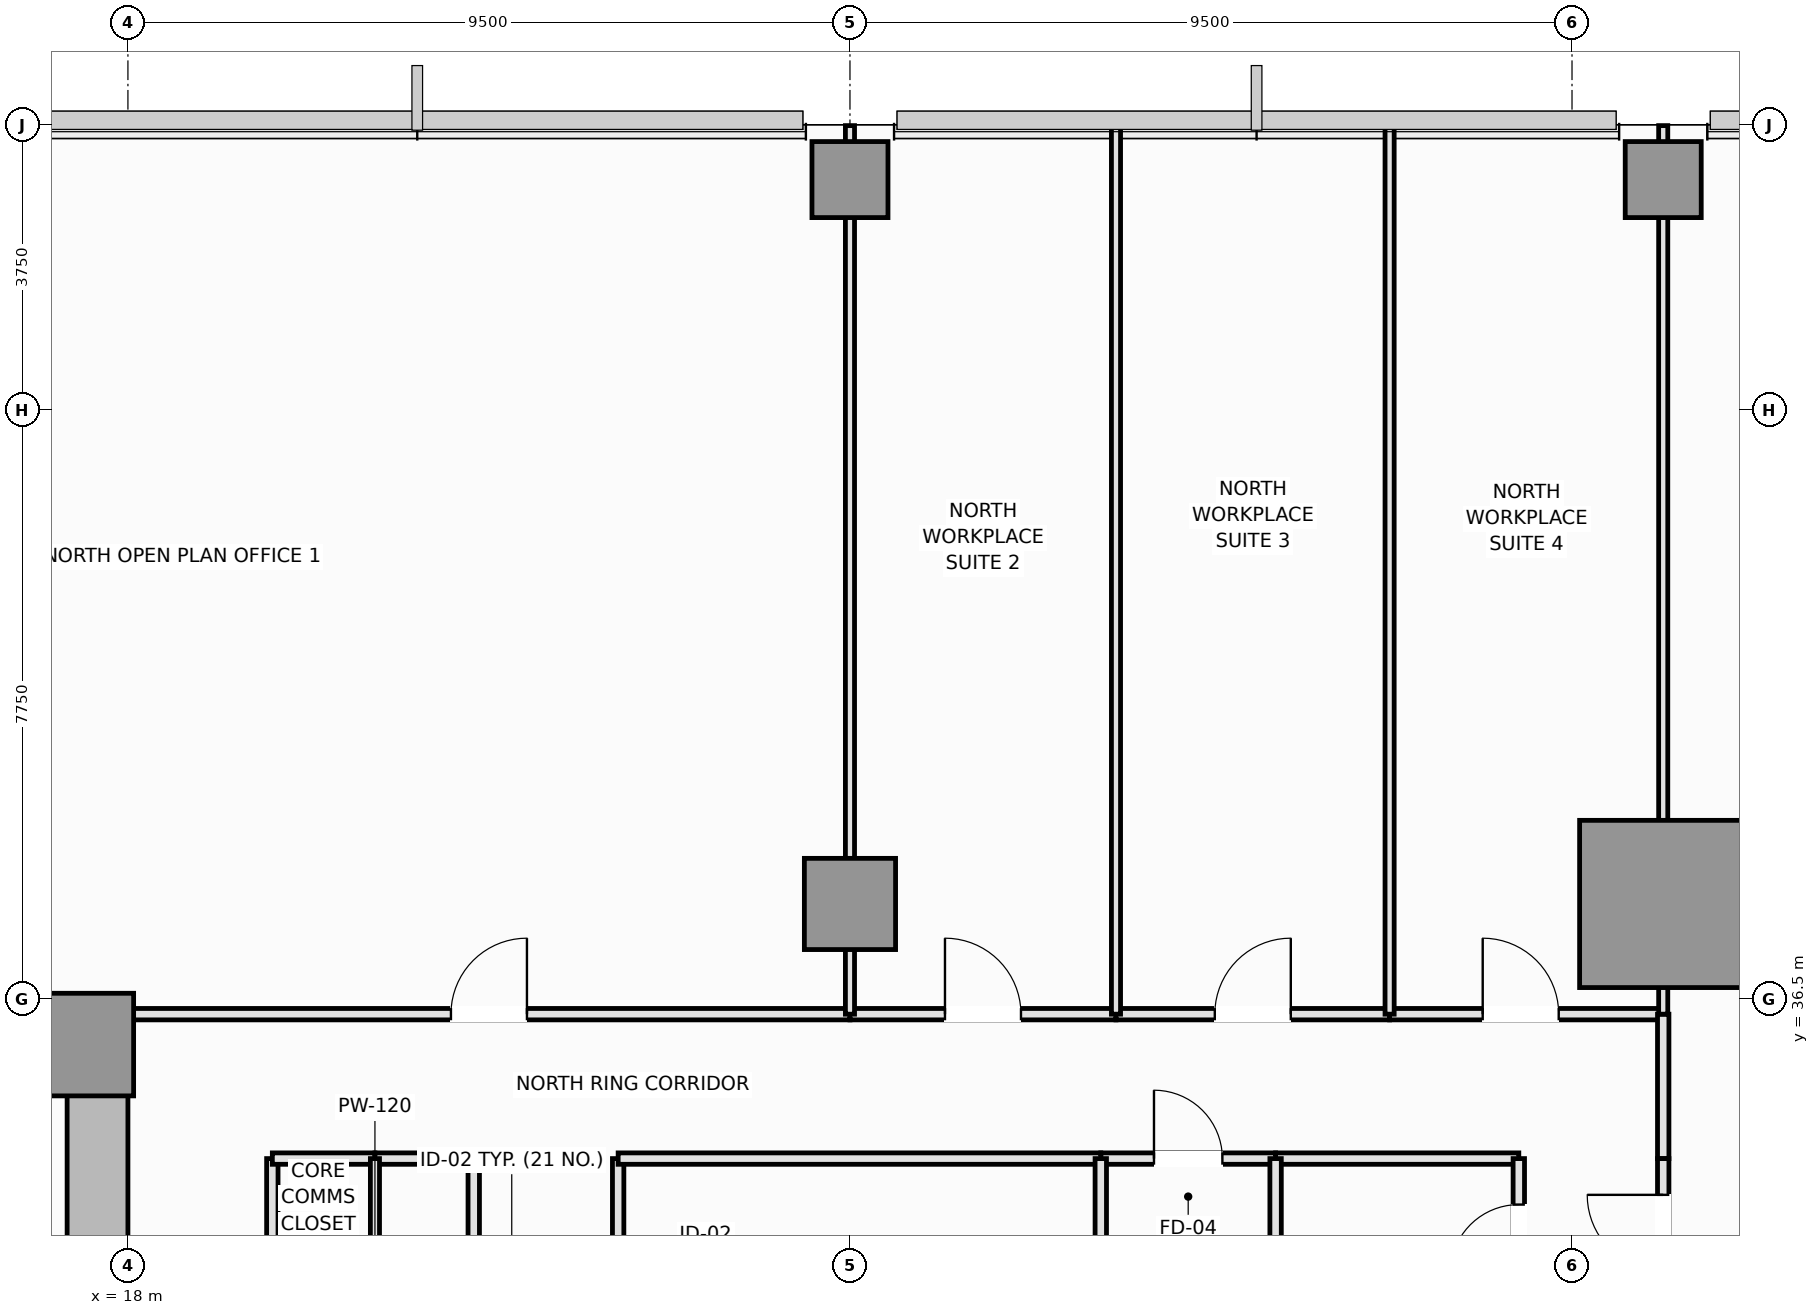
"""IFC4 building model, lengths in metres.
Left out: names, types, materials, properties, quantities, classifications, styles, units other than length and angle.
Written with IfcOpenShell. Run it as: python <this file> out.ifc"""

import sys

from ifc_helpers import new_model, si_unit, direction, frame, frame_2d, origin, origin_2d, place, context, subcontext, project, spatial, rectangle, extrude, element, fill, save


model = new_model("IFC4")
c1 = context("Model", 3, precision=1e-05, world=origin(), true_north=direction((0.0, 1.0)))
c2 = subcontext(c1, "Body", "Model", "MODEL_VIEW")
j1 = project(units=[si_unit("LENGTHUNIT", "METRE"), si_unit("PLANEANGLEUNIT", "RADIAN")], contexts=[c1])
p1 = place(None, origin())
s1 = spatial("IfcSite", under=j1, at=p1, CompositionType="ELEMENT")
p2 = place(p1, origin())
s2 = spatial("IfcBuilding", under=s1, at=p2, CompositionType="ELEMENT")
p3 = place(p2, frame((0.0, 0.0, 78.85)))
s3 = spatial("IfcBuildingStorey", under=s2, at=p3, CompositionType="ELEMENT", Elevation=78.85)
p4 = place(p3, frame((4.5, 36.1, 0.0), z_axis=(0.0, 0.0, 1.0), x_axis=(1.0, 0.0, 0.0)))
e1 = element("IfcWall", 1, at=p4, inside=s3, PredefinedType="SHEAR", context=c2, shape_type="SweptSolid", body=[
    extrude(rectangle(XDim=13.5, YDim=0.8, at=frame_2d((6.75, 0.0))), origin(), (0.0, 0.0, 1.0), 3.55),
])
p5 = place(p3, frame((17.6, 27.05, 0.0), z_axis=(0.0, 0.0, 1.0), x_axis=(0.0, 1.0, 0.0)))
e2 = element("IfcWall", 2, at=p5, inside=s3, PredefinedType="SHEAR", context=c2, shape_type="SweptSolid", body=[
    extrude(rectangle(XDim=8.65, YDim=0.8, at=frame_2d((4.325, 0.0))), origin(), (0.0, 0.0, 1.0), 3.55),
])
p6 = place(p5, frame((3.45, 0.0, 0.0)))
e3 = element("IfcOpeningElement", 3, at=p6, cuts=e2, PredefinedType="OPENING", context=c2, shape_type="SweptSolid", body=[
    extrude(rectangle(XDim=1.1, YDim=2.15, at=frame_2d((0.55, 1.075))), frame((0.0, 0.41, 0.0), z_axis=(0.0, -1.0, 0.0), x_axis=(1.0, 0.0, 0.0)), (0.0, 0.0, 1.0), 0.82),
])
p7 = place(p3, frame((17.4, 35.9, 0.0), z_axis=(0.0, 0.0, 1.0), x_axis=(1.0, 0.0, 0.0)))
e4 = element("IfcColumn", 4, at=p7, inside=s3, PredefinedType="PILASTER", context=c2, shape_type="SweptSolid", body=[
    extrude(rectangle(XDim=1.35, YDim=1.35, at=origin_2d()), origin(), (0.0, 0.0, 1.0), 3.55),
])
p8 = place(p3, frame((38.2, 37.75, 0.0), z_axis=(0.0, 0.0, 1.0), x_axis=(1.0, 0.0, 0.0)))
e5 = element("IfcColumn", 5, at=p8, inside=s3, PredefinedType="COLUMN", context=c2, shape_type="SweptSolid", body=[
    extrude(rectangle(XDim=2.2, YDim=2.2, at=origin_2d()), origin(), (0.0, 0.0, 1.0), 3.55),
])
p9 = place(p3, frame((27.5, 37.75, 0.0), z_axis=(0.0, 0.0, 1.0), x_axis=(1.0, 0.0, 0.0)))
e6 = element("IfcColumn", 6, at=p9, inside=s3, PredefinedType="COLUMN", context=c2, shape_type="SweptSolid", body=[
    extrude(rectangle(XDim=1.2, YDim=1.2, at=origin_2d()), origin(), (0.0, 0.0, 1.0), 3.55),
])
for number, where, z_axis, x_axis in (
    (7, (27.5, 47.28, 0.0), (0.0, 0.0, 1.0), (1.0, 0.0, 0.0)),
    (8, (38.2, 47.28, 0.0), (0.0, 0.0, 1.0), (1.0, 0.0, 0.0)),
):
    element("IfcColumn", number, at=place(p3, frame(where, z_axis=z_axis, x_axis=x_axis)), inside=s3, PredefinedType="COLUMN", context=c2, shape_type="SweptSolid", body=[
        extrude(rectangle(XDim=1.0, YDim=1.0, at=origin_2d()), origin(), (0.0, 0.0, 1.0), 3.55),
    ])
p10 = place(p3, frame((22.55, 29.75, 0.0), z_axis=(0.0, 0.0, 1.0), x_axis=(0.0, 1.0, 0.0)))
e9 = element("IfcWall", 9, at=p10, inside=s3, PredefinedType="PARTITIONING", context=c2, shape_type="SweptSolid", body=[
    extrude(rectangle(XDim=4.65, YDim=0.15, at=frame_2d((2.325, 0.0))), origin(), (0.0, 0.0, 1.0), 3.01),
])
p11 = place(p10, frame((1.825, 0.0, 0.0)))
e10 = element("IfcOpeningElement", 10, at=p11, cuts=e9, PredefinedType="OPENING", context=c2, shape_type="SweptSolid", body=[
    extrude(rectangle(XDim=1.0, YDim=2.15, at=frame_2d((0.5, 1.075))), frame((0.0, 0.085, 0.0), z_axis=(0.0, -1.0, 0.0), x_axis=(1.0, 0.0, 0.0)), (0.0, 0.0, 1.0), 0.17),
])
p12 = place(p3, frame((24.45, 31.3, 0.0), z_axis=(0.0, 0.0, 1.0), x_axis=(0.0, 1.0, 0.0)))
e11 = element("IfcWall", 11, at=p12, inside=s3, PredefinedType="PARTITIONING", context=c2, shape_type="SweptSolid", body=[
    extrude(rectangle(XDim=3.1, YDim=0.15, at=frame_2d((1.55, 0.0))), origin(), (0.0, 0.0, 1.0), 3.37),
])
p13 = place(p12, frame((1.05, 0.0, 0.0)))
e12 = element("IfcOpeningElement", 12, at=p13, cuts=e11, PredefinedType="OPENING", context=c2, shape_type="SweptSolid", body=[
    extrude(rectangle(XDim=1.0, YDim=2.15, at=frame_2d((0.5, 1.075))), frame((0.0, 0.085, 0.0), z_axis=(0.0, -1.0, 0.0), x_axis=(1.0, 0.0, 0.0)), (0.0, 0.0, 1.0), 0.17),
])
p14 = place(p3, frame((19.9, 29.75, 0.0), z_axis=(0.0, 0.0, 1.0), x_axis=(0.0, 1.0, 0.0)))
e13 = element("IfcWall", 13, at=p14, inside=s3, PredefinedType="PARTITIONING", context=c2, shape_type="SweptSolid", body=[
    extrude(rectangle(XDim=4.65, YDim=0.15, at=frame_2d((2.325, 0.0))), origin(), (0.0, 0.0, 1.0), 3.37),
])
p15 = place(p14, frame((1.825, 0.0, 0.0)))
e14 = element("IfcOpeningElement", 14, at=p15, cuts=e13, PredefinedType="OPENING", context=c2, shape_type="SweptSolid", body=[
    extrude(rectangle(XDim=1.0, YDim=2.15, at=frame_2d((0.5, 1.075))), frame((0.0, 0.085, 0.0), z_axis=(0.0, -1.0, 0.0), x_axis=(1.0, 0.0, 0.0)), (0.0, 0.0, 1.0), 0.17),
])
p16 = place(p3, frame((19.9, 34.4, 0.0), z_axis=(0.0, 0.0, 1.0), x_axis=(1.0, 0.0, 0.0)))
e15 = element("IfcWall", 15, at=p16, inside=s3, PredefinedType="PARTITIONING", context=c2, shape_type="SweptSolid", body=[
    extrude(rectangle(XDim=1.35, YDim=0.15, at=frame_2d((0.675, 0.0))), origin(), (0.0, 0.0, 1.0), 3.37),
])
p17 = place(p3, frame((21.25, 34.4, 0.0), z_axis=(0.0, 0.0, 1.0), x_axis=(1.0, 0.0, 0.0)))
e16 = element("IfcWall", 16, at=p17, inside=s3, PredefinedType="PARTITIONING", context=c2, shape_type="SweptSolid", body=[
    extrude(rectangle(XDim=1.3, YDim=0.15, at=frame_2d((0.65, 0.0))), origin(), (0.0, 0.0, 1.0), 3.37),
])
p18 = place(p3, frame((33.1, 34.4, 0.0), z_axis=(0.0, 0.0, 1.0), x_axis=(1.0, 0.0, 0.0)))
e17 = element("IfcWall", 17, at=p18, inside=s3, PredefinedType="PLUMBINGWALL", context=c2, shape_type="SweptSolid", body=[
    extrude(rectangle(XDim=3.2, YDim=0.15, at=frame_2d((1.6, 0.0))), origin(), (0.0, 0.0, 1.0), 3.37),
])
p19 = place(p3, frame((30.8, 34.4, 0.0), z_axis=(0.0, 0.0, 1.0), x_axis=(1.0, 0.0, 0.0)))
e18 = element("IfcWall", 18, at=p19, inside=s3, PredefinedType="PLUMBINGWALL", context=c2, shape_type="SweptSolid", body=[
    extrude(rectangle(XDim=2.3, YDim=0.15, at=frame_2d((1.15, 0.0))), origin(), (0.0, 0.0, 1.0), 3.37),
])
p20 = place(p19, frame((0.7, 0.0, 0.0)))
e19 = element("IfcOpeningElement", 19, at=p20, cuts=e18, PredefinedType="OPENING", context=c2, shape_type="SweptSolid", body=[
    extrude(rectangle(XDim=0.9, YDim=2.1, at=frame_2d((0.45, 1.05))), frame((0.0, 0.085, 0.0), z_axis=(0.0, -1.0, 0.0), x_axis=(1.0, 0.0, 0.0)), (0.0, 0.0, 1.0), 0.17),
])
p21 = place(p3, frame((24.45, 34.4, 0.0), z_axis=(0.0, 0.0, 1.0), x_axis=(1.0, 0.0, 0.0)))
e20 = element("IfcWall", 20, at=p21, inside=s3, PredefinedType="PARTITIONING", context=c2, shape_type="SweptSolid", body=[
    extrude(rectangle(XDim=6.35, YDim=0.15, at=frame_2d((3.175, 0.0))), origin(), (0.0, 0.0, 1.0), 3.37),
])
p22 = place(p3, frame((18.0, 36.3, 0.0), z_axis=(0.0, 0.0, 1.0), x_axis=(1.0, 0.0, 0.0)))
e21 = element("IfcWall", 21, at=p22, inside=s3, PredefinedType="PARTITIONING", context=c2, shape_type="SweptSolid", body=[
    extrude(rectangle(XDim=9.5, YDim=0.15, at=frame_2d((4.75, 0.0))), origin(), (0.0, 0.0, 1.0), 3.37),
])
p23 = place(p22, frame((4.25, 0.0, 0.0)))
e22 = element("IfcOpeningElement", 22, at=p23, cuts=e21, PredefinedType="OPENING", context=c2, shape_type="SweptSolid", body=[
    extrude(rectangle(XDim=1.0, YDim=2.15, at=frame_2d((0.5, 1.075))), frame((0.0, 0.085, 0.0), z_axis=(0.0, -1.0, 0.0), x_axis=(1.0, 0.0, 0.0)), (0.0, 0.0, 1.0), 0.17),
])
p24 = place(p3, frame((27.5, 36.3, 0.0), z_axis=(0.0, 0.0, 1.0), x_axis=(1.0, 0.0, 0.0)))
e23 = element("IfcWall", 23, at=p24, inside=s3, PredefinedType="PARTITIONING", context=c2, shape_type="SweptSolid", body=[
    extrude(rectangle(XDim=3.5, YDim=0.15, at=frame_2d((1.75, 0.0))), origin(), (0.0, 0.0, 1.0), 3.37),
])
p25 = place(p24, frame((1.25, 0.0, 0.0)))
e24 = element("IfcOpeningElement", 24, at=p25, cuts=e23, PredefinedType="OPENING", context=c2, shape_type="SweptSolid", body=[
    extrude(rectangle(XDim=1.0, YDim=2.15, at=frame_2d((0.5, 1.075))), frame((0.0, 0.085, 0.0), z_axis=(0.0, -1.0, 0.0), x_axis=(1.0, 0.0, 0.0)), (0.0, 0.0, 1.0), 0.17),
])
p26 = place(p3, frame((31.0, 36.3, 0.0), z_axis=(0.0, 0.0, 1.0), x_axis=(1.0, 0.0, 0.0)))
e25 = element("IfcWall", 25, at=p26, inside=s3, PredefinedType="PARTITIONING", context=c2, shape_type="SweptSolid", body=[
    extrude(rectangle(XDim=3.6, YDim=0.15, at=frame_2d((1.8, 0.0))), origin(), (0.0, 0.0, 1.0), 3.37),
])
p27 = place(p26, frame((1.3, 0.0, 0.0)))
e26 = element("IfcOpeningElement", 26, at=p27, cuts=e25, PredefinedType="OPENING", context=c2, shape_type="SweptSolid", body=[
    extrude(rectangle(XDim=1.0, YDim=2.15, at=frame_2d((0.5, 1.075))), frame((0.0, 0.085, 0.0), z_axis=(0.0, -1.0, 0.0), x_axis=(1.0, 0.0, 0.0)), (0.0, 0.0, 1.0), 0.17),
])
p28 = place(p3, frame((34.6, 36.3, 0.0), z_axis=(0.0, 0.0, 1.0), x_axis=(1.0, 0.0, 0.0)))
e27 = element("IfcWall", 27, at=p28, inside=s3, PredefinedType="PARTITIONING", context=c2, shape_type="SweptSolid", body=[
    extrude(rectangle(XDim=3.6, YDim=0.15, at=frame_2d((1.8, 0.0))), origin(), (0.0, 0.0, 1.0), 3.37),
])
p29 = place(p28, frame((1.225, 0.0, 0.0)))
e28 = element("IfcOpeningElement", 28, at=p29, cuts=e27, PredefinedType="OPENING", context=c2, shape_type="SweptSolid", body=[
    extrude(rectangle(XDim=1.0, YDim=2.15, at=frame_2d((0.5, 1.075))), frame((0.0, 0.085, 0.0), z_axis=(0.0, -1.0, 0.0), x_axis=(1.0, 0.0, 0.0)), (0.0, 0.0, 1.0), 0.17),
])
p30 = place(p3, frame((38.2, 34.4, 0.0), z_axis=(0.0, 0.0, 1.0), x_axis=(0.0, 1.0, 0.0)))
e29 = element("IfcWall", 29, at=p30, inside=s3, PredefinedType="PARTITIONING", context=c2, shape_type="SweptSolid", body=[
    extrude(rectangle(XDim=1.9, YDim=0.15, at=frame_2d((0.95, 0.0))), origin(), (0.0, 0.0, 1.0), 2.82),
])
p31 = place(p3, frame((36.3, 31.3, 0.0), z_axis=(0.0, 0.0, 1.0), x_axis=(0.0, 1.0, 0.0)))
e30 = element("IfcWall", 30, at=p31, inside=s3, PredefinedType="PLUMBINGWALL", context=c2, shape_type="SweptSolid", body=[
    extrude(rectangle(XDim=3.1, YDim=0.15, at=frame_2d((1.55, 0.0))), origin(), (0.0, 0.0, 1.0), 3.37),
])
p32 = place(p31, frame((1.595, 0.0, 0.0)))
e31 = element("IfcOpeningElement", 31, at=p32, cuts=e30, PredefinedType="OPENING", context=c2, shape_type="SweptSolid", body=[
    extrude(rectangle(XDim=0.9, YDim=2.1, at=frame_2d((0.45, 1.05))), frame((0.0, 0.085, 0.0), z_axis=(0.0, -1.0, 0.0), x_axis=(1.0, 0.0, 0.0)), (0.0, 0.0, 1.0), 0.17),
])
p33 = place(p3, frame((38.2, 32.0, 0.0), z_axis=(0.0, 0.0, 1.0), x_axis=(0.0, 1.0, 0.0)))
e32 = element("IfcWall", 32, at=p33, inside=s3, PredefinedType="PARTITIONING", context=c2, shape_type="SweptSolid", body=[
    extrude(rectangle(XDim=2.4, YDim=0.15, at=frame_2d((1.2, 0.0))), origin(), (0.0, 0.0, 1.0), 2.82),
])
p34 = place(p33, frame((0.923, 0.0, 0.0)))
e33 = element("IfcOpeningElement", 33, at=p34, cuts=e32, PredefinedType="OPENING", context=c2, shape_type="SweptSolid", body=[
    extrude(rectangle(XDim=1.0, YDim=2.15, at=frame_2d((0.5, 1.075))), frame((0.0, 0.085, 0.0), z_axis=(0.0, -1.0, 0.0), x_axis=(1.0, 0.0, 0.0)), (0.0, 0.0, 1.0), 0.17),
])
p35 = place(p3, frame((21.25, 29.75, 0.0), z_axis=(0.0, 0.0, 1.0), x_axis=(0.0, 1.0, 0.0)))
e34 = element("IfcWall", 34, at=p35, inside=s3, PredefinedType="PARTITIONING", context=c2, shape_type="SweptSolid", body=[
    extrude(rectangle(XDim=4.65, YDim=0.12, at=frame_2d((2.325, 0.0))), origin(), (0.0, 0.0, 1.0), 3.37),
])
for number, where, z_axis, x_axis in (
    (35, (33.1, 31.3, 0.0), (0.0, 0.0, 1.0), (0.0, 1.0, 0.0)),
    (36, (30.8, 31.3, 0.0), (0.0, 0.0, 1.0), (0.0, 1.0, 0.0)),
):
    element("IfcWall", number, at=place(p3, frame(where, z_axis=z_axis, x_axis=x_axis)), inside=s3, PredefinedType="PLUMBINGWALL", context=c2, shape_type="SweptSolid", body=[
        extrude(rectangle(XDim=3.1, YDim=0.15, at=frame_2d((1.55, 0.0))), origin(), (0.0, 0.0, 1.0), 3.37),
    ])
p36 = place(p3, frame((27.5, 36.3, 0.0), z_axis=(0.0, 0.0, 1.0), x_axis=(0.0, 1.0, 0.0)))
e37 = element("IfcWall", 37, at=p36, inside=s3, PredefinedType="PARTITIONING", context=c2, shape_type="SweptSolid", body=[
    extrude(rectangle(XDim=11.69, YDim=0.12, at=frame_2d((5.845, 0.0))), origin(), (0.0, 0.0, 1.0), 2.82),
])
for number, where, z_axis, x_axis in (
    (38, (31.0, 36.3, 0.0), (0.0, 0.0, 1.0), (0.0, 1.0, 0.0)),
    (39, (34.6, 36.3, 0.0), (0.0, 0.0, 1.0), (0.0, 1.0, 0.0)),
):
    element("IfcWall", number, at=place(p3, frame(where, z_axis=z_axis, x_axis=x_axis)), inside=s3, PredefinedType="PARTITIONING", context=c2, shape_type="SweptSolid", body=[
        extrude(rectangle(XDim=11.69, YDim=0.12, at=frame_2d((5.845, 0.0))), origin(), (0.0, 0.0, 1.0), 3.37),
    ])
p37 = place(p3, frame((38.2, 36.3, 0.0), z_axis=(0.0, 0.0, 1.0), x_axis=(0.0, 1.0, 0.0)))
e40 = element("IfcWall", 40, at=p37, inside=s3, PredefinedType="PARTITIONING", context=c2, shape_type="SweptSolid", body=[
    extrude(rectangle(XDim=11.69, YDim=0.12, at=frame_2d((5.845, 0.0))), origin(), (0.0, 0.0, 1.0), 2.82),
])
p38 = place(p20, origin())
e41 = element("IfcDoor", 41, at=p38, inside=s3, OperationType="SINGLE_SWING_LEFT", PredefinedType="DOOR", context=c2, shape_type="SweptSolid", body=[
    extrude(rectangle(XDim=0.9, YDim=2.1, at=frame_2d((0.45, 1.05))), frame((0.0, 0.025, 0.0), z_axis=(0.0, -1.0, 0.0), x_axis=(1.0, 0.0, 0.0)), (0.0, 0.0, 1.0), 0.05),
])
fill(e19, e41)
p39 = place(p23, origin())
e42 = element("IfcDoor", 42, at=p39, inside=s3, OperationType="SINGLE_SWING_RIGHT", PredefinedType="DOOR", context=c2, shape_type="SweptSolid", body=[
    extrude(rectangle(XDim=1.0, YDim=2.15, at=frame_2d((0.5, 1.075))), frame((0.0, 0.025, 0.0), z_axis=(0.0, -1.0, 0.0), x_axis=(1.0, 0.0, 0.0)), (0.0, 0.0, 1.0), 0.05),
])
fill(e22, e42)
p40 = place(p25, origin())
e43 = element("IfcDoor", 43, at=p40, inside=s3, OperationType="SINGLE_SWING_LEFT", PredefinedType="DOOR", context=c2, shape_type="SweptSolid", body=[
    extrude(rectangle(XDim=1.0, YDim=2.15, at=frame_2d((0.5, 1.075))), frame((0.0, 0.025, 0.0), z_axis=(0.0, -1.0, 0.0), x_axis=(1.0, 0.0, 0.0)), (0.0, 0.0, 1.0), 0.05),
])
fill(e24, e43)
p41 = place(p27, origin())
e44 = element("IfcDoor", 44, at=p41, inside=s3, OperationType="SINGLE_SWING_RIGHT", PredefinedType="DOOR", context=c2, shape_type="SweptSolid", body=[
    extrude(rectangle(XDim=1.0, YDim=2.15, at=frame_2d((0.5, 1.075))), frame((0.0, 0.025, 0.0), z_axis=(0.0, -1.0, 0.0), x_axis=(1.0, 0.0, 0.0)), (0.0, 0.0, 1.0), 0.05),
])
fill(e26, e44)
p42 = place(p29, origin())
e45 = element("IfcDoor", 45, at=p42, inside=s3, OperationType="SINGLE_SWING_LEFT", PredefinedType="DOOR", context=c2, shape_type="SweptSolid", body=[
    extrude(rectangle(XDim=1.0, YDim=2.15, at=frame_2d((0.5, 1.075))), frame((0.0, 0.025, 0.0), z_axis=(0.0, -1.0, 0.0), x_axis=(1.0, 0.0, 0.0)), (0.0, 0.0, 1.0), 0.05),
])
fill(e28, e45)
p43 = place(p32, origin())
e46 = element("IfcDoor", 46, at=p43, inside=s3, OperationType="SINGLE_SWING_LEFT", PredefinedType="DOOR", context=c2, shape_type="SweptSolid", body=[
    extrude(rectangle(XDim=0.9, YDim=2.1, at=frame_2d((0.45, 1.05))), frame((0.0, 0.025, 0.0), z_axis=(0.0, -1.0, 0.0), x_axis=(1.0, 0.0, 0.0)), (0.0, 0.0, 1.0), 0.05),
])
fill(e31, e46)
p44 = place(p34, origin())
e47 = element("IfcDoor", 47, at=p44, inside=s3, OperationType="SINGLE_SWING_RIGHT", PredefinedType="DOOR", context=c2, shape_type="SweptSolid", body=[
    extrude(rectangle(XDim=1.0, YDim=2.15, at=frame_2d((0.5, 1.075))), frame((0.0, 0.025, 0.0), z_axis=(0.0, -1.0, 0.0), x_axis=(1.0, 0.0, 0.0)), (0.0, 0.0, 1.0), 0.05),
])
fill(e33, e47)
save(model, sys.argv[1])
